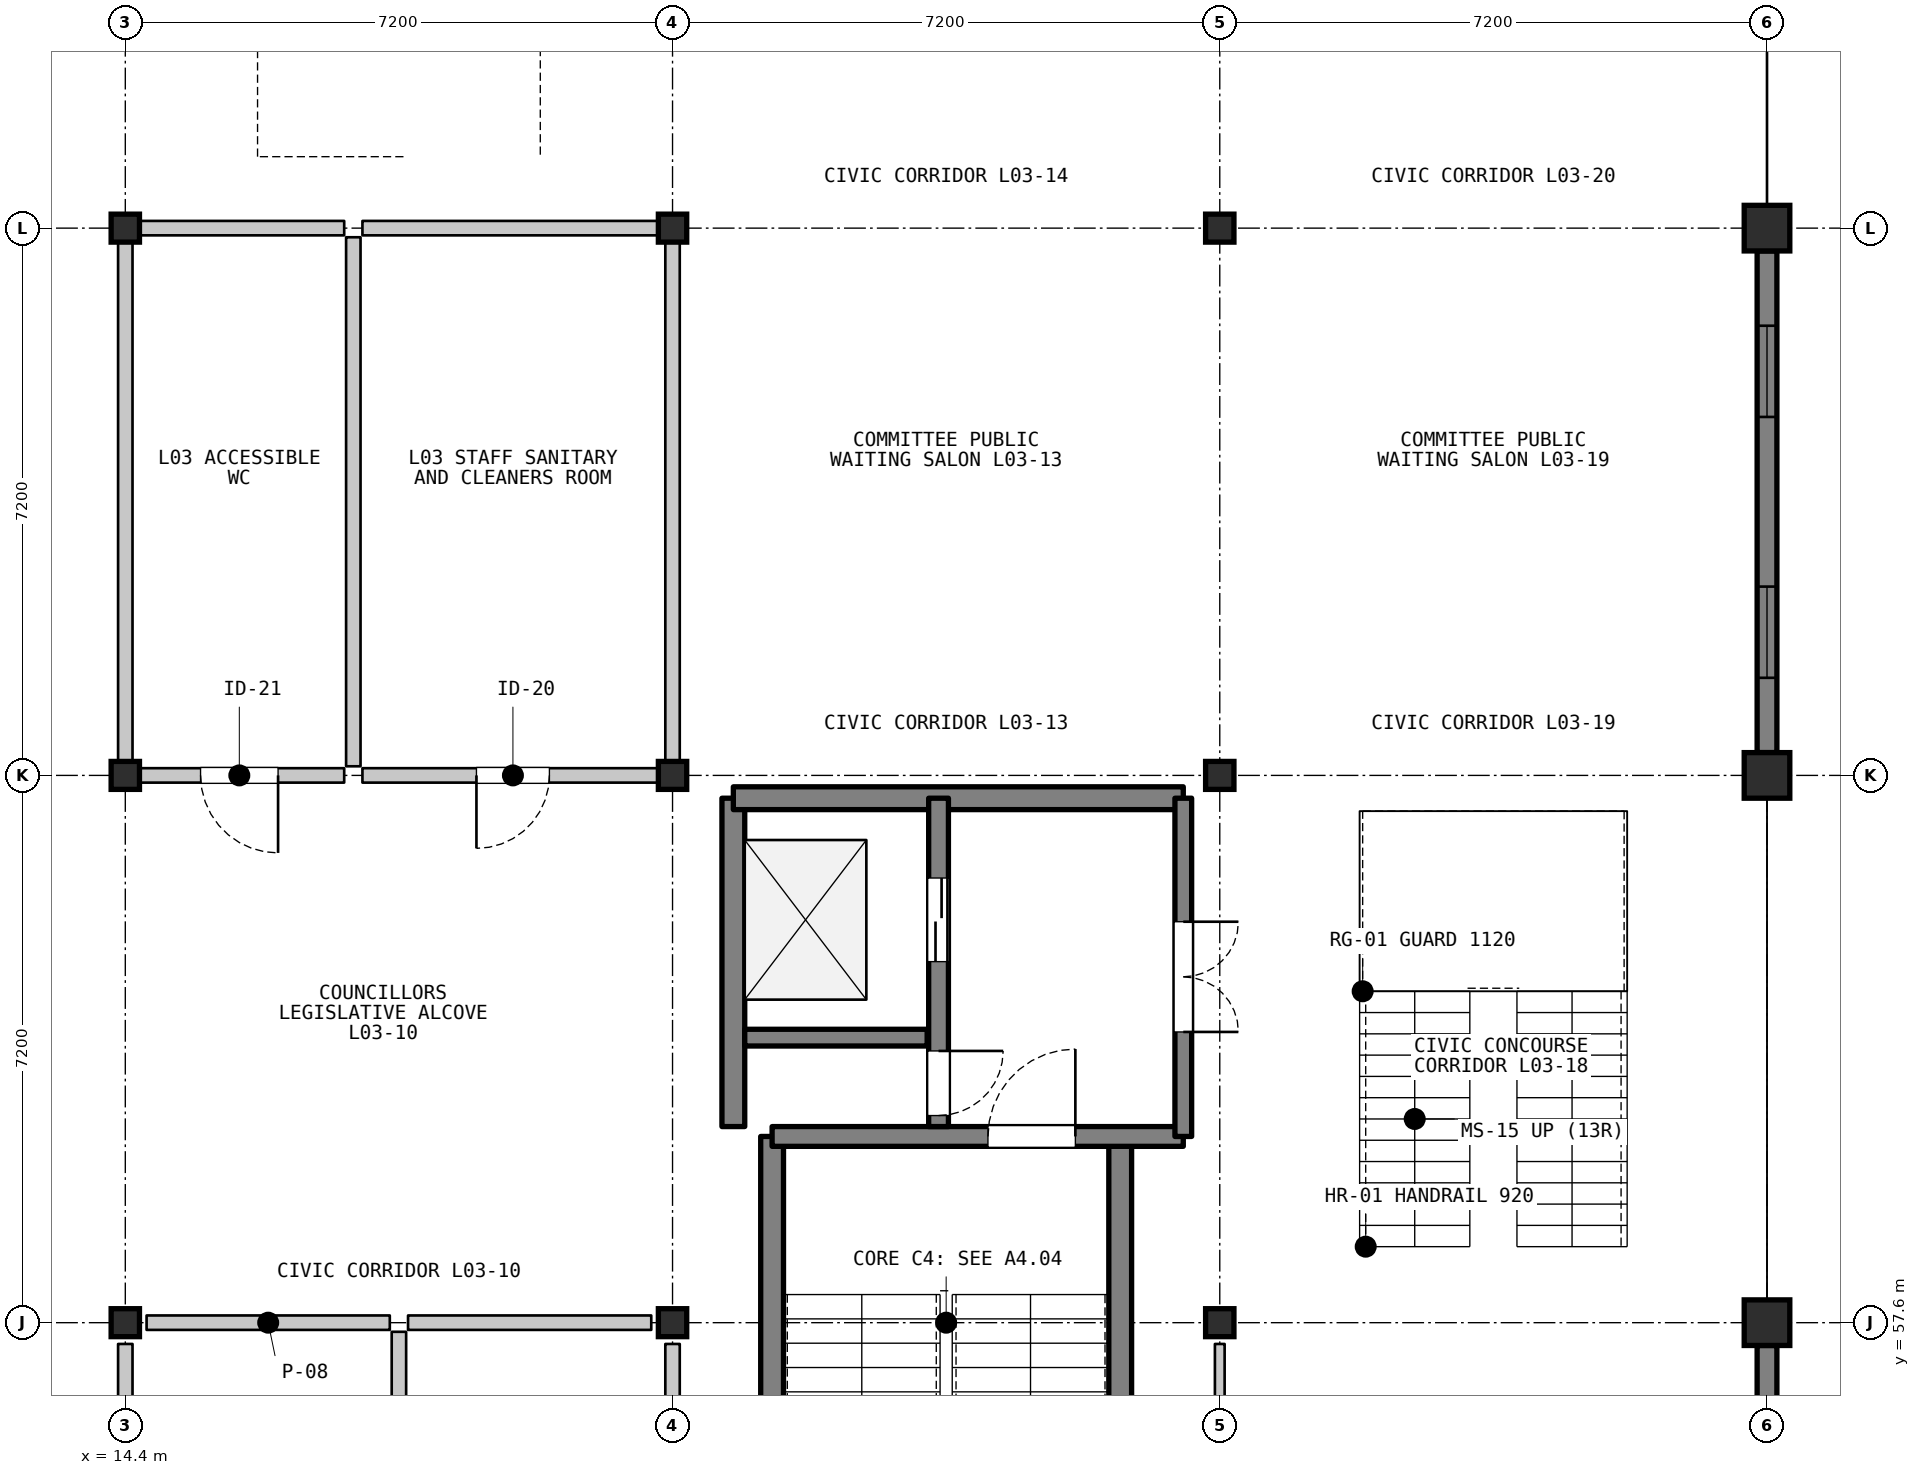
"""IFC4 building model, lengths in metres.
Left out: names, types, materials, properties, quantities, classifications, styles, units other than length and angle.
Written with IfcOpenShell. Run it as: python <this file> out.ifc"""

import sys

from ifc_helpers import new_model, si_unit, direction, frame, frame_2d, origin, origin_2d, place, context, subcontext, project, spatial, rectangle, i_section, extrude, element, fill, save


model = new_model("IFC4")
c1 = context("Model", 3, precision=1e-05, world=origin(), true_north=direction((0.0, 1.0)))
c2 = subcontext(c1, "Body", "Model", "MODEL_VIEW")
j1 = project(units=[si_unit("LENGTHUNIT", "METRE"), si_unit("PLANEANGLEUNIT", "RADIAN")], contexts=[c1])
p1 = place(None, origin())
s1 = spatial("IfcSite", under=j1, at=p1, CompositionType="ELEMENT")
p2 = place(p1, origin())
s2 = spatial("IfcBuilding", under=s1, at=p2, CompositionType="ELEMENT")
p3 = place(p2, frame((0.0, 0.0, 9.9)))
s3 = spatial("IfcBuildingStorey", under=s2, at=p3, CompositionType="ELEMENT", Elevation=9.9)
for number, where, z_axis, x_axis in (
    (1, (14.4, 57.6, 0.0), (0.0, 0.0, 1.0), (1.0, 0.0, 0.0)),
    (2, (14.4, 64.8, 0.0), (0.0, 0.0, 1.0), (1.0, 0.0, 0.0)),
    (3, (14.4, 72.0, 0.0), (0.0, 0.0, 1.0), (1.0, 0.0, 0.0)),
    (4, (21.6, 57.6, 0.0), (0.0, 0.0, 1.0), (1.0, 0.0, 0.0)),
    (5, (21.6, 64.8, 0.0), (0.0, 0.0, 1.0), (1.0, 0.0, 0.0)),
    (6, (21.6, 72.0, 0.0), (0.0, 0.0, 1.0), (1.0, 0.0, 0.0)),
    (7, (28.8, 57.6, 0.0), (0.0, 0.0, 1.0), (1.0, 0.0, 0.0)),
    (8, (28.8, 64.8, 0.0), (0.0, 0.0, 1.0), (1.0, 0.0, 0.0)),
    (9, (28.8, 72.0, 0.0), (0.0, 0.0, 1.0), (1.0, 0.0, 0.0)),
):
    element("IfcColumn", number, at=place(p3, frame(where, z_axis=z_axis, x_axis=x_axis)), inside=s3, PredefinedType="COLUMN", context=c2, shape_type="SweptSolid", body=[
        extrude(i_section(OverallWidth=0.373, OverallDepth=0.368, WebThickness=0.015, FlangeThickness=0.024, FilletRadius=0.015, at=origin_2d()), origin(), (0.0, 0.0, 1.0), 4.2),
    ])
for number, where, z_axis, x_axis in (
    (10, (36.0, 57.6, 0.0), (0.0, 0.0, 1.0), (1.0, 0.0, 0.0)),
    (11, (36.0, 64.8, 0.0), (0.0, 0.0, 1.0), (1.0, 0.0, 0.0)),
    (12, (36.0, 72.0, 0.0), (0.0, 0.0, 1.0), (1.0, 0.0, 0.0)),
):
    element("IfcColumn", number, at=place(p3, frame(where, z_axis=z_axis, x_axis=x_axis)), inside=s3, PredefinedType="COLUMN", context=c2, shape_type="SweptSolid", body=[
        extrude(rectangle(XDim=0.6, YDim=0.6, at=origin_2d()), origin(), (0.0, 0.0, 1.0), 4.2),
    ])
p4 = place(p3, frame((36.0, 57.3, 0.0), z_axis=(0.0, 0.0, 1.0), x_axis=(0.0, -1.0, 0.0)))
e13 = element("IfcWall", 13, at=p4, inside=s3, PredefinedType="SOLIDWALL", context=c2, shape_type="SweptSolid", body=[
    extrude(rectangle(XDim=6.6, YDim=0.26, at=frame_2d((3.3, 0.0))), origin(), (0.0, 0.0, 1.0), 3.487),
])
p5 = place(p4, frame((1.95, 0.0, 0.95)))
e14 = element("IfcOpeningElement", 14, at=p5, cuts=e13, PredefinedType="OPENING", context=c2, shape_type="SweptSolid", body=[
    extrude(rectangle(XDim=2.7, YDim=1.8, at=frame_2d((1.35, 0.9))), frame((0.0, 0.14, 0.0), z_axis=(0.0, -1.0, 0.0), x_axis=(1.0, 0.0, 0.0)), (0.0, 0.0, 1.0), 0.28),
])
p6 = place(p3, frame((36.0, 71.7, 0.0), z_axis=(0.0, 0.0, 1.0), x_axis=(0.0, -1.0, 0.0)))
e15 = element("IfcWall", 15, at=p6, inside=s3, PredefinedType="SOLIDWALL", context=c2, shape_type="SweptSolid", body=[
    extrude(rectangle(XDim=6.6, YDim=0.26, at=frame_2d((3.3, 0.0))), origin(), (0.0, 0.0, 1.0), 3.487),
])
p7 = place(p6, frame((0.984, 0.0, 0.95)))
e16 = element("IfcOpeningElement", 16, at=p7, cuts=e15, PredefinedType="OPENING", context=c2, shape_type="SweptSolid", body=[
    extrude(rectangle(XDim=1.2, YDim=1.7, at=frame_2d((0.6, 0.85))), frame((0.0, 0.14, 0.0), z_axis=(0.0, -1.0, 0.0), x_axis=(1.0, 0.0, 0.0)), (0.0, 0.0, 1.0), 0.28),
])
p8 = place(p6, frame((4.416, 0.0, 0.95)))
e17 = element("IfcOpeningElement", 17, at=p8, cuts=e15, PredefinedType="OPENING", context=c2, shape_type="SweptSolid", body=[
    extrude(rectangle(XDim=1.2, YDim=1.7, at=frame_2d((0.6, 0.85))), frame((0.0, 0.14, 0.0), z_axis=(0.0, -1.0, 0.0), x_axis=(1.0, 0.0, 0.0)), (0.0, 0.0, 1.0), 0.28),
])
for number, where, z_axis, x_axis in (
    (18, (22.91, 50.75, 0.0), (0.0, 0.0, 1.0), (0.0, 1.0, 0.0)),
    (19, (27.49, 50.75, 0.0), (0.0, 0.0, 1.0), (0.0, 1.0, 0.0)),
):
    element("IfcWall", number, at=place(p3, frame(where, z_axis=z_axis, x_axis=x_axis)), inside=s3, PredefinedType="SHEAR", context=c2, shape_type="SweptSolid", body=[
        extrude(rectangle(XDim=9.3, YDim=0.3, at=frame_2d((4.65, 0.0))), origin(), (0.0, 0.0, 1.0), 4.02),
    ])
p9 = place(p3, frame((22.91, 60.05, 0.0), z_axis=(0.0, 0.0, 1.0), x_axis=(1.0, 0.0, 0.0)))
e20 = element("IfcWall", 20, at=p9, inside=s3, PredefinedType="SHEAR", context=c2, shape_type="SweptSolid", body=[
    extrude(rectangle(XDim=5.41, YDim=0.26, at=frame_2d((2.705, 0.0))), origin(), (0.0, 0.0, 1.0), 4.02),
])
p10 = place(p9, frame((2.84, 0.0, 0.0)))
e21 = element("IfcOpeningElement", 21, at=p10, cuts=e20, PredefinedType="OPENING", context=c2, shape_type="SweptSolid", body=[
    extrude(rectangle(XDim=1.15, YDim=2.15, at=frame_2d((0.575, 1.075))), frame((0.0, 0.14, 0.0), z_axis=(0.0, -1.0, 0.0), x_axis=(1.0, 0.0, 0.0)), (0.0, 0.0, 1.0), 0.28),
])
p11 = place(p3, frame((22.4, 60.18, 0.0), z_axis=(0.0, 0.0, 1.0), x_axis=(0.0, 1.0, 0.0)))
e22 = element("IfcWall", 22, at=p11, inside=s3, PredefinedType="SHEAR", context=c2, shape_type="SweptSolid", body=[
    extrude(rectangle(XDim=4.32, YDim=0.3, at=frame_2d((2.16, 0.0))), origin(), (0.0, 0.0, 1.0), 4.02),
])
p12 = place(p3, frame((22.4, 64.5, 0.0), z_axis=(0.0, 0.0, 1.0), x_axis=(1.0, 0.0, 0.0)))
e23 = element("IfcWall", 23, at=p12, inside=s3, PredefinedType="SHEAR", context=c2, shape_type="SweptSolid", body=[
    extrude(rectangle(XDim=5.92, YDim=0.3, at=frame_2d((2.96, 0.0))), origin(), (0.0, 0.0, 1.0), 4.02),
])
p13 = place(p3, frame((22.55, 61.35, 0.0), z_axis=(0.0, 0.0, 1.0), x_axis=(1.0, 0.0, 0.0)))
e24 = element("IfcWall", 24, at=p13, inside=s3, PredefinedType="SHEAR", context=c2, shape_type="SweptSolid", body=[
    extrude(rectangle(XDim=2.4, YDim=0.22, at=frame_2d((1.2, 0.0))), origin(), (0.0, 0.0, 1.0), 4.02),
])
p14 = place(p3, frame((25.1, 64.5, 0.0), z_axis=(0.0, 0.0, 1.0), x_axis=(0.0, -1.0, 0.0)))
e25 = element("IfcWall", 25, at=p14, inside=s3, PredefinedType="SHEAR", context=c2, shape_type="SweptSolid", body=[
    extrude(rectangle(XDim=4.32, YDim=0.26, at=frame_2d((2.16, 0.0))), origin(), (0.0, 0.0, 1.0), 4.02),
])
p15 = place(p14, frame((1.05, 0.0, 0.0)))
e26 = element("IfcOpeningElement", 26, at=p15, cuts=e25, PredefinedType="OPENING", context=c2, shape_type="SweptSolid", body=[
    extrude(rectangle(XDim=1.1, YDim=2.15, at=frame_2d((0.55, 1.075))), frame((0.0, 0.14, 0.0), z_axis=(0.0, -1.0, 0.0), x_axis=(1.0, 0.0, 0.0)), (0.0, 0.0, 1.0), 0.28),
])
p16 = place(p14, frame((3.325, 0.0, 0.0)))
e27 = element("IfcOpeningElement", 27, at=p16, cuts=e25, PredefinedType="OPENING", context=c2, shape_type="SweptSolid", body=[
    extrude(rectangle(XDim=0.85, YDim=2.05, at=frame_2d((0.425, 1.025))), frame((0.0, 0.14, 0.0), z_axis=(0.0, -1.0, 0.0), x_axis=(1.0, 0.0, 0.0)), (0.0, 0.0, 1.0), 0.28),
])
p17 = place(p3, frame((28.32, 64.5, 0.0), z_axis=(0.0, 0.0, 1.0), x_axis=(0.0, -1.0, 0.0)))
e28 = element("IfcWall", 28, at=p17, inside=s3, PredefinedType="SHEAR", context=c2, shape_type="SweptSolid", body=[
    extrude(rectangle(XDim=4.45, YDim=0.22, at=frame_2d((2.225, 0.0))), origin(), (0.0, 0.0, 1.0), 4.02),
])
p18 = place(p17, frame((1.625, 0.0, 0.0)))
e29 = element("IfcOpeningElement", 29, at=p18, cuts=e28, PredefinedType="OPENING", context=c2, shape_type="SweptSolid", body=[
    extrude(rectangle(XDim=1.45, YDim=2.2, at=frame_2d((0.725, 1.1))), frame((0.0, 0.12, 0.0), z_axis=(0.0, -1.0, 0.0), x_axis=(1.0, 0.0, 0.0)), (0.0, 0.0, 1.0), 0.24),
])
p19 = place(p3, frame((14.68, 57.6, 0.0), z_axis=(0.0, 0.0, 1.0), x_axis=(1.0, 0.0, 0.0)))
e30 = element("IfcWall", 30, at=p19, inside=s3, PredefinedType="PARTITIONING", context=c2, shape_type="SweptSolid", body=[
    extrude(rectangle(XDim=3.2, YDim=0.19, at=frame_2d((1.6, 0.0))), origin(), (0.0, 0.0, 1.0), 3.408),
])
p20 = place(p3, frame((14.4, 50.52, 0.0), z_axis=(0.0, 0.0, 1.0), x_axis=(0.0, 1.0, 0.0)))
e31 = element("IfcWall", 31, at=p20, inside=s3, PredefinedType="PARTITIONING", context=c2, shape_type="SweptSolid", body=[
    extrude(rectangle(XDim=6.8, YDim=0.19, at=frame_2d((3.4, 0.0))), origin(), (0.0, 0.0, 1.0), 3.388),
])
p21 = place(p3, frame((18.0, 57.48, 0.0), z_axis=(0.0, 0.0, 1.0), x_axis=(0.0, -1.0, 0.0)))
e32 = element("IfcWall", 32, at=p21, inside=s3, PredefinedType="PARTITIONING", context=c2, shape_type="SweptSolid", body=[
    extrude(rectangle(XDim=6.96, YDim=0.19, at=frame_2d((3.48, 0.0))), origin(), (0.0, 0.0, 1.0), 3.388),
])
p22 = place(p3, frame((18.12, 57.6, 0.0), z_axis=(0.0, 0.0, 1.0), x_axis=(1.0, 0.0, 0.0)))
e33 = element("IfcWall", 33, at=p22, inside=s3, PredefinedType="PARTITIONING", context=c2, shape_type="SweptSolid", body=[
    extrude(rectangle(XDim=3.2, YDim=0.19, at=frame_2d((1.6, 0.0))), origin(), (0.0, 0.0, 1.0), 3.408),
])
p23 = place(p3, frame((21.6, 57.32, 0.0), z_axis=(0.0, 0.0, 1.0), x_axis=(0.0, -1.0, 0.0)))
e34 = element("IfcWall", 34, at=p23, inside=s3, PredefinedType="PARTITIONING", context=c2, shape_type="SweptSolid", body=[
    extrude(rectangle(XDim=6.8, YDim=0.19, at=frame_2d((3.4, 0.0))), origin(), (0.0, 0.0, 1.0), 3.388),
])
p24 = place(p3, frame((17.28, 64.8, 0.0), z_axis=(0.0, 0.0, 1.0), x_axis=(-1.0, 0.0, 0.0)))
e35 = element("IfcWall", 35, at=p24, inside=s3, PredefinedType="PARTITIONING", context=c2, shape_type="SweptSolid", body=[
    extrude(rectangle(XDim=2.76, YDim=0.19, at=frame_2d((1.38, 0.0))), origin(), (0.0, 0.0, 1.0), 3.408),
])
p25 = place(p24, frame((0.87, 0.0, 0.0)))
e36 = element("IfcOpeningElement", 36, at=p25, cuts=e35, PredefinedType="OPENING", context=c2, shape_type="SweptSolid", body=[
    extrude(rectangle(XDim=1.02, YDim=2.15, at=frame_2d((0.51, 1.075))), frame((0.0, 0.105, 0.0), z_axis=(0.0, -1.0, 0.0), x_axis=(1.0, 0.0, 0.0)), (0.0, 0.0, 1.0), 0.21),
])
p26 = place(p3, frame((14.52, 72.0, 0.0), z_axis=(0.0, 0.0, 1.0), x_axis=(1.0, 0.0, 0.0)))
e37 = element("IfcWall", 37, at=p26, inside=s3, PredefinedType="PARTITIONING", context=c2, shape_type="SweptSolid", body=[
    extrude(rectangle(XDim=2.76, YDim=0.19, at=frame_2d((1.38, 0.0))), origin(), (0.0, 0.0, 1.0), 3.408),
])
for number, where, z_axis, x_axis in (
    (38, (14.4, 64.92, 0.0), (0.0, 0.0, 1.0), (0.0, 1.0, 0.0)),
    (39, (17.4, 71.88, 0.0), (0.0, 0.0, 1.0), (0.0, -1.0, 0.0)),
):
    element("IfcWall", number, at=place(p3, frame(where, z_axis=z_axis, x_axis=x_axis)), inside=s3, PredefinedType="PARTITIONING", context=c2, shape_type="SweptSolid", body=[
        extrude(rectangle(XDim=6.96, YDim=0.19, at=frame_2d((3.48, 0.0))), origin(), (0.0, 0.0, 1.0), 3.408),
    ])
p27 = place(p3, frame((21.48, 64.8, 0.0), z_axis=(0.0, 0.0, 1.0), x_axis=(-1.0, 0.0, 0.0)))
e40 = element("IfcWall", 40, at=p27, inside=s3, PredefinedType="PARTITIONING", context=c2, shape_type="SweptSolid", body=[
    extrude(rectangle(XDim=3.96, YDim=0.19, at=frame_2d((1.98, 0.0))), origin(), (0.0, 0.0, 1.0), 3.408),
])
p28 = place(p27, frame((1.5, 0.0, 0.0)))
e41 = element("IfcOpeningElement", 41, at=p28, cuts=e40, PredefinedType="OPENING", context=c2, shape_type="SweptSolid", body=[
    extrude(rectangle(XDim=0.96, YDim=2.1, at=frame_2d((0.48, 1.05))), frame((0.0, 0.105, 0.0), z_axis=(0.0, -1.0, 0.0), x_axis=(1.0, 0.0, 0.0)), (0.0, 0.0, 1.0), 0.21),
])
p29 = place(p3, frame((17.52, 72.0, 0.0), z_axis=(0.0, 0.0, 1.0), x_axis=(1.0, 0.0, 0.0)))
e42 = element("IfcWall", 42, at=p29, inside=s3, PredefinedType="PARTITIONING", context=c2, shape_type="SweptSolid", body=[
    extrude(rectangle(XDim=3.96, YDim=0.19, at=frame_2d((1.98, 0.0))), origin(), (0.0, 0.0, 1.0), 3.408),
])
p30 = place(p3, frame((21.6, 71.88, 0.0), z_axis=(0.0, 0.0, 1.0), x_axis=(0.0, -1.0, 0.0)))
e43 = element("IfcWall", 43, at=p30, inside=s3, PredefinedType="PARTITIONING", context=c2, shape_type="SweptSolid", body=[
    extrude(rectangle(XDim=6.96, YDim=0.19, at=frame_2d((3.48, 0.0))), origin(), (0.0, 0.0, 1.0), 3.408),
])
p31 = place(p3, frame((28.8, 50.52, 0.0), z_axis=(0.0, 0.0, 1.0), x_axis=(0.0, 1.0, 0.0)))
e44 = element("IfcWall", 44, at=p31, inside=s3, PredefinedType="PARTITIONING", context=c2, shape_type="SweptSolid", body=[
    extrude(rectangle(XDim=6.8, YDim=0.128, at=frame_2d((3.4, 0.0))), origin(), (0.0, 0.0, 1.0), 3.388),
])
p32 = place(p7, origin())
e45 = element("IfcWindow", 45, at=p32, inside=s3, PartitioningType="SINGLE_PANEL", PredefinedType="WINDOW", context=c2, shape_type="SweptSolid", body=[
    extrude(rectangle(XDim=1.2, YDim=1.7, at=frame_2d((0.6, 0.85))), frame((0.0, 0.03, 0.0), z_axis=(0.0, -1.0, 0.0), x_axis=(1.0, 0.0, 0.0)), (0.0, 0.0, 1.0), 0.06),
])
fill(e16, e45)
p33 = place(p8, origin())
e46 = element("IfcWindow", 46, at=p33, inside=s3, PartitioningType="SINGLE_PANEL", PredefinedType="WINDOW", context=c2, shape_type="SweptSolid", body=[
    extrude(rectangle(XDim=1.2, YDim=1.7, at=frame_2d((0.6, 0.85))), frame((0.0, 0.03, 0.0), z_axis=(0.0, -1.0, 0.0), x_axis=(1.0, 0.0, 0.0)), (0.0, 0.0, 1.0), 0.06),
])
fill(e17, e46)
p34 = place(p10, origin())
e47 = element("IfcDoor", 47, at=p34, inside=s3, OperationType="SINGLE_SWING_RIGHT", PredefinedType="DOOR", context=c2, shape_type="SweptSolid", body=[
    extrude(rectangle(XDim=1.15, YDim=2.15, at=frame_2d((0.575, 1.075))), frame((0.0, 0.025, 0.0), z_axis=(0.0, -1.0, 0.0), x_axis=(1.0, 0.0, 0.0)), (0.0, 0.0, 1.0), 0.05),
])
fill(e21, e47)
p35 = place(p15, origin())
e48 = element("IfcDoor", 48, at=p35, inside=s3, OperationType="DOUBLE_DOOR_SLIDING", PredefinedType="DOOR", context=c2, shape_type="SweptSolid", body=[
    extrude(rectangle(XDim=1.1, YDim=2.15, at=frame_2d((0.55, 1.075))), frame((0.0, 0.025, 0.0), z_axis=(0.0, -1.0, 0.0), x_axis=(1.0, 0.0, 0.0)), (0.0, 0.0, 1.0), 0.05),
])
fill(e26, e48)
p36 = place(p16, origin())
e49 = element("IfcDoor", 49, at=p36, inside=s3, OperationType="SINGLE_SWING_LEFT", PredefinedType="DOOR", context=c2, shape_type="SweptSolid", body=[
    extrude(rectangle(XDim=0.85, YDim=2.05, at=frame_2d((0.425, 1.025))), frame((0.0, 0.025, 0.0), z_axis=(0.0, -1.0, 0.0), x_axis=(1.0, 0.0, 0.0)), (0.0, 0.0, 1.0), 0.05),
])
fill(e27, e49)
p37 = place(p18, origin())
e50 = element("IfcDoor", 50, at=p37, inside=s3, OperationType="DOUBLE_DOOR_SINGLE_SWING", PredefinedType="DOOR", context=c2, shape_type="SweptSolid", body=[
    extrude(rectangle(XDim=1.45, YDim=2.2, at=frame_2d((0.725, 1.1))), frame((0.0, 0.025, 0.0), z_axis=(0.0, -1.0, 0.0), x_axis=(1.0, 0.0, 0.0)), (0.0, 0.0, 1.0), 0.05),
])
fill(e29, e50)
p38 = place(p25, origin())
e51 = element("IfcDoor", 51, at=p38, inside=s3, OperationType="SINGLE_SWING_LEFT", PredefinedType="DOOR", context=c2, shape_type="SweptSolid", body=[
    extrude(rectangle(XDim=1.02, YDim=2.15, at=frame_2d((0.51, 1.075))), frame((0.0, 0.025, 0.0), z_axis=(0.0, -1.0, 0.0), x_axis=(1.0, 0.0, 0.0)), (0.0, 0.0, 1.0), 0.05),
])
fill(e36, e51)
p39 = place(p28, origin())
e52 = element("IfcDoor", 52, at=p39, inside=s3, OperationType="SINGLE_SWING_RIGHT", PredefinedType="DOOR", context=c2, shape_type="SweptSolid", body=[
    extrude(rectangle(XDim=0.96, YDim=2.1, at=frame_2d((0.48, 1.05))), frame((0.0, 0.025, 0.0), z_axis=(0.0, -1.0, 0.0), x_axis=(1.0, 0.0, 0.0)), (0.0, 0.0, 1.0), 0.05),
])
fill(e41, e52)
save(model, sys.argv[1])
